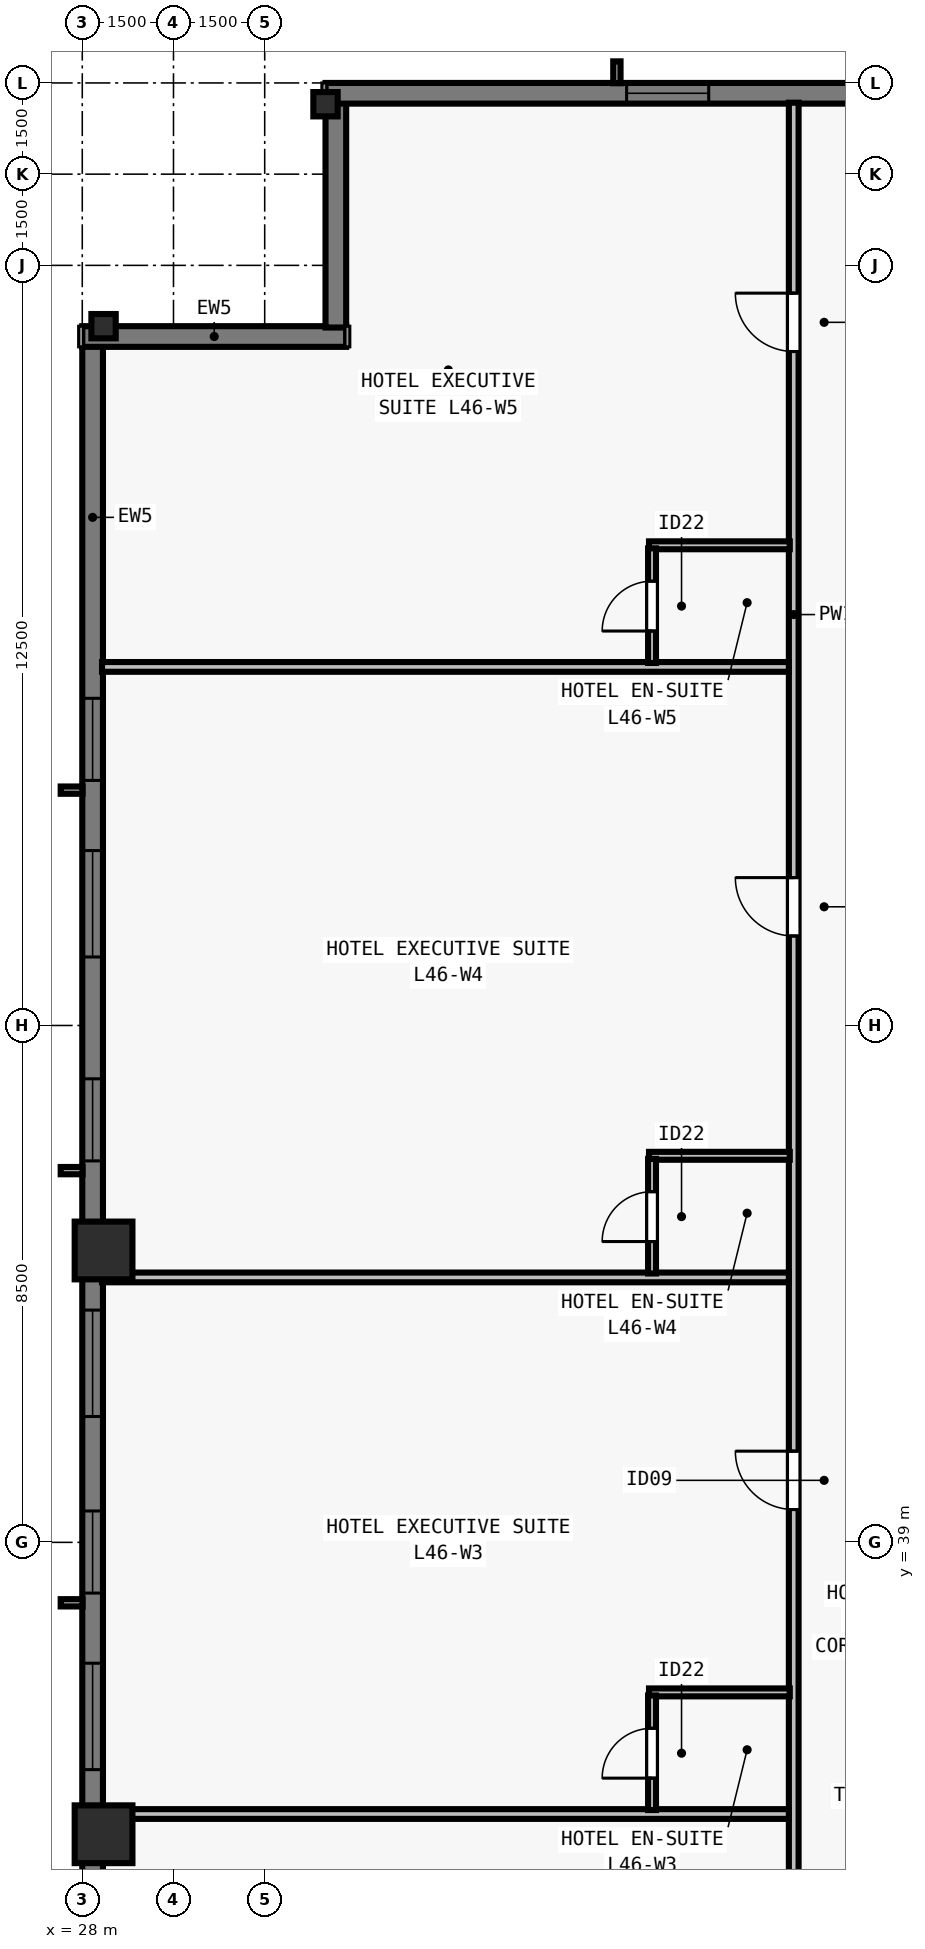
"""IFC4 building model, lengths in metres.
Left out: names, types, materials, properties, quantities, classifications, styles, units other than length and angle.
Written with IfcOpenShell. Run it as: python <this file> out.ifc"""

import sys

from ifc_helpers import new_model, si_unit, direction, frame, frame_2d, origin, origin_2d, place, context, subcontext, project, spatial, rectangle, i_section, extrude, element, fill, save


model = new_model("IFC4")
c1 = context("Model", 3, precision=1e-05, world=origin(), true_north=direction((0.0, 1.0)))
c2 = subcontext(c1, "Body", "Model", "MODEL_VIEW")
j1 = project(units=[si_unit("LENGTHUNIT", "METRE"), si_unit("PLANEANGLEUNIT", "RADIAN")], contexts=[c1])
p1 = place(None, origin())
s1 = spatial("IfcSite", under=j1, at=p1, CompositionType="ELEMENT")
p2 = place(p1, origin())
s2 = spatial("IfcBuilding", under=s1, at=p2, CompositionType="ELEMENT")
p3 = place(p2, frame((0.0, 0.0, 169.0)))
s3 = spatial("IfcBuildingStorey", under=s2, at=p3, CompositionType="ELEMENT", Elevation=169.0)
for number, where, z_axis, x_axis in (
    (1, (32.0, 62.65, 0.0), (0.0, 0.0, 1.0), (1.0, 0.0, 0.0)),
    (2, (28.35, 59.0, 0.0), (0.0, 0.0, 1.0), (0.0, 1.0, 0.0)),
):
    element("IfcColumn", number, at=place(p3, frame(where, z_axis=z_axis, x_axis=x_axis)), inside=s3, PredefinedType="COLUMN", context=c2, shape_type="SweptSolid", body=[
        extrude(i_section(OverallWidth=0.4, OverallDepth=0.4, WebThickness=0.022, FlangeThickness=0.036, at=origin_2d()), origin(), (0.0, 0.0, 1.0), 3.5),
    ])
for number, where, z_axis, x_axis in (
    (3, (28.35, 43.8, 0.0), (0.0, 0.0, 1.0), (0.0, 1.0, 0.0)),
    (4, (28.35, 34.2, 0.0), (0.0, 0.0, 1.0), (0.0, 1.0, 0.0)),
):
    element("IfcColumn", number, at=place(p3, frame(where, z_axis=z_axis, x_axis=x_axis)), inside=s3, PredefinedType="COLUMN", context=c2, shape_type="SweptSolid", body=[
        extrude(rectangle(XDim=0.95, YDim=0.95, at=origin_2d()), origin(), (0.0, 0.0, 1.0), 3.5),
    ])
p4 = place(p3, frame((28.17, 19.0, 0.0), z_axis=(0.0, 0.0, 1.0), x_axis=(0.0, 1.0, 0.0)))
e5 = element("IfcWall", 5, at=p4, inside=s3, PredefinedType="SOLIDWALL", context=c2, shape_type="SweptSolid", body=[
    extrude(rectangle(XDim=39.682, YDim=0.34, at=frame_2d((19.841, 0.0))), origin(), (0.0, 0.0, 1.0), 3.28),
])
p5 = place(p4, frame((5.802, 0.0, 0.8)))
e6 = element("IfcOpeningElement", 6, at=p5, cuts=e5, PredefinedType="OPENING", context=c2, shape_type="SweptSolid", body=[
    extrude(rectangle(XDim=1.35, YDim=1.66, at=frame_2d((0.675, 0.83))), frame((0.0, 0.18, 0.0), z_axis=(0.0, -1.0, 0.0), x_axis=(1.0, 0.0, 0.0)), (0.0, 0.0, 1.0), 0.36),
])
p6 = place(p4, frame((8.305, 0.0, 0.8)))
e7 = element("IfcOpeningElement", 7, at=p6, cuts=e5, PredefinedType="OPENING", context=c2, shape_type="SweptSolid", body=[
    extrude(rectangle(XDim=1.75, YDim=1.66, at=frame_2d((0.875, 0.83))), frame((0.0, 0.18, 0.0), z_axis=(0.0, -1.0, 0.0), x_axis=(1.0, 0.0, 0.0)), (0.0, 0.0, 1.0), 0.36),
])
p7 = place(p4, frame((12.059, 0.0, 0.8)))
e8 = element("IfcOpeningElement", 8, at=p7, cuts=e5, PredefinedType="OPENING", context=c2, shape_type="SweptSolid", body=[
    extrude(rectangle(XDim=1.35, YDim=1.66, at=frame_2d((0.675, 0.83))), frame((0.0, 0.18, 0.0), z_axis=(0.0, -1.0, 0.0), x_axis=(1.0, 0.0, 0.0)), (0.0, 0.0, 1.0), 0.36),
])
p8 = place(p4, frame((16.262, 0.0, 0.8)))
e9 = element("IfcOpeningElement", 9, at=p8, cuts=e5, PredefinedType="OPENING", context=c2, shape_type="SweptSolid", body=[
    extrude(rectangle(XDim=1.75, YDim=1.66, at=frame_2d((0.875, 0.83))), frame((0.0, 0.18, 0.0), z_axis=(0.0, -1.0, 0.0), x_axis=(1.0, 0.0, 0.0)), (0.0, 0.0, 1.0), 0.36),
])
p9 = place(p4, frame((19.166, 0.0, 0.8)))
e10 = element("IfcOpeningElement", 10, at=p9, cuts=e5, PredefinedType="OPENING", context=c2, shape_type="SweptSolid", body=[
    extrude(rectangle(XDim=1.35, YDim=1.66, at=frame_2d((0.675, 0.83))), frame((0.0, 0.18, 0.0), z_axis=(0.0, -1.0, 0.0), x_axis=(1.0, 0.0, 0.0)), (0.0, 0.0, 1.0), 0.36),
])
p10 = place(p4, frame((22.07, 0.0, 0.8)))
e11 = element("IfcOpeningElement", 11, at=p10, cuts=e5, PredefinedType="OPENING", context=c2, shape_type="SweptSolid", body=[
    extrude(rectangle(XDim=1.75, YDim=1.66, at=frame_2d((0.875, 0.83))), frame((0.0, 0.18, 0.0), z_axis=(0.0, -1.0, 0.0), x_axis=(1.0, 0.0, 0.0)), (0.0, 0.0, 1.0), 0.36),
])
p11 = place(p4, frame((26.273, 0.0, 0.8)))
e12 = element("IfcOpeningElement", 12, at=p11, cuts=e5, PredefinedType="OPENING", context=c2, shape_type="SweptSolid", body=[
    extrude(rectangle(XDim=1.35, YDim=1.66, at=frame_2d((0.675, 0.83))), frame((0.0, 0.18, 0.0), z_axis=(0.0, -1.0, 0.0), x_axis=(1.0, 0.0, 0.0)), (0.0, 0.0, 1.0), 0.36),
])
p12 = place(p4, frame((29.627, 0.0, 0.8)))
e13 = element("IfcOpeningElement", 13, at=p12, cuts=e5, PredefinedType="OPENING", context=c2, shape_type="SweptSolid", body=[
    extrude(rectangle(XDim=1.75, YDim=1.66, at=frame_2d((0.875, 0.83))), frame((0.0, 0.18, 0.0), z_axis=(0.0, -1.0, 0.0), x_axis=(1.0, 0.0, 0.0)), (0.0, 0.0, 1.0), 0.36),
])
p13 = place(p4, frame((32.53, 0.0, 0.8)))
e14 = element("IfcOpeningElement", 14, at=p13, cuts=e5, PredefinedType="OPENING", context=c2, shape_type="SweptSolid", body=[
    extrude(rectangle(XDim=1.35, YDim=1.66, at=frame_2d((0.675, 0.83))), frame((0.0, 0.18, 0.0), z_axis=(0.0, -1.0, 0.0), x_axis=(1.0, 0.0, 0.0)), (0.0, 0.0, 1.0), 0.36),
])
p14 = place(p3, frame((28.0, 58.83, 0.0), z_axis=(0.0, 0.0, 1.0), x_axis=(1.0, 0.0, 0.0)))
e15 = element("IfcWall", 15, at=p14, inside=s3, PredefinedType="SOLIDWALL", context=c2, shape_type="SweptSolid", body=[
    extrude(rectangle(XDim=4.34, YDim=0.34, at=frame_2d((2.17, 0.0))), origin(), (0.0, 0.0, 1.0), 3.28),
])
p15 = place(p3, frame((32.17, 58.978, 0.0), z_axis=(0.0, 0.0, 1.0), x_axis=(0.0, 1.0, 0.0)))
e16 = element("IfcWall", 16, at=p15, inside=s3, PredefinedType="SOLIDWALL", context=c2, shape_type="SweptSolid", body=[
    extrude(rectangle(XDim=3.704, YDim=0.34, at=frame_2d((1.852, 0.0))), origin(), (0.0, 0.0, 1.0), 3.28),
])
p16 = place(p3, frame((32.0, 62.83, 0.0), z_axis=(0.0, 0.0, 1.0), x_axis=(1.0, 0.0, 0.0)))
e17 = element("IfcWall", 17, at=p16, inside=s3, PredefinedType="SOLIDWALL", context=c2, shape_type="SweptSolid", body=[
    extrude(rectangle(XDim=39.682, YDim=0.34, at=frame_2d((19.841, 0.0))), origin(), (0.0, 0.0, 1.0), 3.28),
])
p17 = place(p16, frame((4.952, 0.0, 0.8)))
e18 = element("IfcOpeningElement", 18, at=p17, cuts=e17, PredefinedType="OPENING", context=c2, shape_type="SweptSolid", body=[
    extrude(rectangle(XDim=1.35, YDim=1.66, at=frame_2d((0.675, 0.83))), frame((0.0, 0.18, 0.0), z_axis=(0.0, -1.0, 0.0), x_axis=(1.0, 0.0, 0.0)), (0.0, 0.0, 1.0), 0.36),
])
p18 = place(p16, frame((12.059, 0.0, 0.8)))
e19 = element("IfcOpeningElement", 19, at=p18, cuts=e17, PredefinedType="OPENING", context=c2, shape_type="SweptSolid", body=[
    extrude(rectangle(XDim=1.35, YDim=1.66, at=frame_2d((0.675, 0.83))), frame((0.0, 0.18, 0.0), z_axis=(0.0, -1.0, 0.0), x_axis=(1.0, 0.0, 0.0)), (0.0, 0.0, 1.0), 0.36),
])
p19 = place(p16, frame((19.166, 0.0, 0.8)))
e20 = element("IfcOpeningElement", 20, at=p19, cuts=e17, PredefinedType="OPENING", context=c2, shape_type="SweptSolid", body=[
    extrude(rectangle(XDim=1.35, YDim=1.66, at=frame_2d((0.675, 0.83))), frame((0.0, 0.18, 0.0), z_axis=(0.0, -1.0, 0.0), x_axis=(1.0, 0.0, 0.0)), (0.0, 0.0, 1.0), 0.36),
])
p20 = place(p16, frame((21.27, 0.0, 0.8)))
e21 = element("IfcOpeningElement", 21, at=p20, cuts=e17, PredefinedType="OPENING", context=c2, shape_type="SweptSolid", body=[
    extrude(rectangle(XDim=1.75, YDim=1.66, at=frame_2d((0.875, 0.83))), frame((0.0, 0.18, 0.0), z_axis=(0.0, -1.0, 0.0), x_axis=(1.0, 0.0, 0.0)), (0.0, 0.0, 1.0), 0.36),
])
p21 = place(p16, frame((26.273, 0.0, 0.8)))
e22 = element("IfcOpeningElement", 22, at=p21, cuts=e17, PredefinedType="OPENING", context=c2, shape_type="SweptSolid", body=[
    extrude(rectangle(XDim=1.35, YDim=1.66, at=frame_2d((0.675, 0.83))), frame((0.0, 0.18, 0.0), z_axis=(0.0, -1.0, 0.0), x_axis=(1.0, 0.0, 0.0)), (0.0, 0.0, 1.0), 0.36),
])
p22 = place(p16, frame((29.627, 0.0, 0.8)))
e23 = element("IfcOpeningElement", 23, at=p22, cuts=e17, PredefinedType="OPENING", context=c2, shape_type="SweptSolid", body=[
    extrude(rectangle(XDim=1.75, YDim=1.66, at=frame_2d((0.875, 0.83))), frame((0.0, 0.18, 0.0), z_axis=(0.0, -1.0, 0.0), x_axis=(1.0, 0.0, 0.0)), (0.0, 0.0, 1.0), 0.36),
])
p23 = place(p16, frame((34.47, 0.0, 0.8)))
e24 = element("IfcOpeningElement", 24, at=p23, cuts=e17, PredefinedType="OPENING", context=c2, shape_type="SweptSolid", body=[
    extrude(rectangle(XDim=0.9, YDim=1.66, at=frame_2d((0.45, 0.83))), frame((0.0, 0.18, 0.0), z_axis=(0.0, -1.0, 0.0), x_axis=(1.0, 0.0, 0.0)), (0.0, 0.0, 1.0), 0.36),
])
p24 = place(p3, frame((39.7, 15.325, 0.0), z_axis=(0.0, 0.0, 1.0), x_axis=(0.0, 1.0, 0.0)))
e25 = element("IfcWall", 25, at=p24, inside=s3, PredefinedType="PARTITIONING", context=c2, shape_type="SweptSolid", body=[
    extrude(rectangle(XDim=47.35, YDim=0.16, at=frame_2d((23.675, 0.0))), origin(), (0.0, 0.0, 1.0), 2.555),
])
p25 = place(p24, frame((5.451, 0.0, 0.0)))
e26 = element("IfcOpeningElement", 26, at=p25, cuts=e25, PredefinedType="OPENING", context=c2, shape_type="SweptSolid", body=[
    extrude(rectangle(XDim=0.96, YDim=2.15, at=frame_2d((0.48, 1.075))), frame((0.0, 0.09, 0.0), z_axis=(0.0, -1.0, 0.0), x_axis=(1.0, 0.0, 0.0)), (0.0, 0.0, 1.0), 0.18),
])
p26 = place(p24, frame((14.783, 0.0, 0.0)))
e27 = element("IfcOpeningElement", 27, at=p26, cuts=e25, PredefinedType="OPENING", context=c2, shape_type="SweptSolid", body=[
    extrude(rectangle(XDim=0.96, YDim=2.15, at=frame_2d((0.48, 1.075))), frame((0.0, 0.09, 0.0), z_axis=(0.0, -1.0, 0.0), x_axis=(1.0, 0.0, 0.0)), (0.0, 0.0, 1.0), 0.18),
])
p27 = place(p24, frame((24.215, 0.0, 0.0)))
e28 = element("IfcOpeningElement", 28, at=p27, cuts=e25, PredefinedType="OPENING", context=c2, shape_type="SweptSolid", body=[
    extrude(rectangle(XDim=0.96, YDim=2.15, at=frame_2d((0.48, 1.075))), frame((0.0, 0.09, 0.0), z_axis=(0.0, -1.0, 0.0), x_axis=(1.0, 0.0, 0.0)), (0.0, 0.0, 1.0), 0.18),
])
p28 = place(p24, frame((33.647, 0.0, 0.0)))
e29 = element("IfcOpeningElement", 29, at=p28, cuts=e25, PredefinedType="OPENING", context=c2, shape_type="SweptSolid", body=[
    extrude(rectangle(XDim=0.96, YDim=2.15, at=frame_2d((0.48, 1.075))), frame((0.0, 0.09, 0.0), z_axis=(0.0, -1.0, 0.0), x_axis=(1.0, 0.0, 0.0)), (0.0, 0.0, 1.0), 0.18),
])
p29 = place(p24, frame((43.258, 0.0, 0.0)))
e30 = element("IfcOpeningElement", 30, at=p29, cuts=e25, PredefinedType="OPENING", context=c2, shape_type="SweptSolid", body=[
    extrude(rectangle(XDim=0.96, YDim=2.15, at=frame_2d((0.48, 1.075))), frame((0.0, 0.09, 0.0), z_axis=(0.0, -1.0, 0.0), x_axis=(1.0, 0.0, 0.0)), (0.0, 0.0, 1.0), 0.18),
])
p30 = place(p3, frame((28.325, 34.533, 0.0), z_axis=(0.0, 0.0, 1.0), x_axis=(1.0, 0.0, 0.0)))
e31 = element("IfcWall", 31, at=p30, inside=s3, PredefinedType="PARTITIONING", context=c2, shape_type="SweptSolid", body=[
    extrude(rectangle(XDim=11.295, YDim=0.16, at=frame_2d((5.647, 0.0))), origin(), (0.0, 0.0, 1.0), 2.896),
])
p31 = place(p3, frame((37.32, 36.533, 0.0), z_axis=(0.0, 0.0, 1.0), x_axis=(1.0, 0.0, 0.0)))
e32 = element("IfcWall", 32, at=p31, inside=s3, PredefinedType="PLUMBINGWALL", context=c2, shape_type="SweptSolid", body=[
    extrude(rectangle(XDim=2.315, YDim=0.13, at=frame_2d((1.157, 0.0))), origin(), (0.0, 0.0, 1.0), 3.28),
])
p32 = place(p3, frame((37.37, 34.598, 0.0), z_axis=(0.0, 0.0, 1.0), x_axis=(0.0, 1.0, 0.0)))
e33 = element("IfcWall", 33, at=p32, inside=s3, PredefinedType="PLUMBINGWALL", context=c2, shape_type="SweptSolid", body=[
    extrude(rectangle(XDim=1.885, YDim=0.13, at=frame_2d((0.942, 0.0))), origin(), (0.0, 0.0, 1.0), 3.28),
])
p33 = place(p32, frame((0.525, 0.0, 0.0)))
e34 = element("IfcOpeningElement", 34, at=p33, cuts=e33, PredefinedType="OPENING", context=c2, shape_type="SweptSolid", body=[
    extrude(rectangle(XDim=0.82, YDim=2.1, at=frame_2d((0.41, 1.05))), frame((0.0, 0.075, 0.0), z_axis=(0.0, -1.0, 0.0), x_axis=(1.0, 0.0, 0.0)), (0.0, 0.0, 1.0), 0.15),
])
p34 = place(p3, frame((28.325, 43.357, 0.0), z_axis=(0.0, 0.0, 1.0), x_axis=(1.0, 0.0, 0.0)))
e35 = element("IfcWall", 35, at=p34, inside=s3, PredefinedType="PARTITIONING", context=c2, shape_type="SweptSolid", body=[
    extrude(rectangle(XDim=11.295, YDim=0.16, at=frame_2d((5.647, 0.0))), origin(), (0.0, 0.0, 1.0), 2.896),
])
p35 = place(p3, frame((37.32, 45.357, 0.0), z_axis=(0.0, 0.0, 1.0), x_axis=(1.0, 0.0, 0.0)))
e36 = element("IfcWall", 36, at=p35, inside=s3, PredefinedType="PLUMBINGWALL", context=c2, shape_type="SweptSolid", body=[
    extrude(rectangle(XDim=2.315, YDim=0.13, at=frame_2d((1.157, 0.0))), origin(), (0.0, 0.0, 1.0), 3.28),
])
p36 = place(p3, frame((37.37, 43.422, 0.0), z_axis=(0.0, 0.0, 1.0), x_axis=(0.0, 1.0, 0.0)))
e37 = element("IfcWall", 37, at=p36, inside=s3, PredefinedType="PLUMBINGWALL", context=c2, shape_type="SweptSolid", body=[
    extrude(rectangle(XDim=1.885, YDim=0.13, at=frame_2d((0.942, 0.0))), origin(), (0.0, 0.0, 1.0), 3.28),
])
p37 = place(p36, frame((0.525, 0.0, 0.0)))
e38 = element("IfcOpeningElement", 38, at=p37, cuts=e37, PredefinedType="OPENING", context=c2, shape_type="SweptSolid", body=[
    extrude(rectangle(XDim=0.82, YDim=2.1, at=frame_2d((0.41, 1.05))), frame((0.0, 0.075, 0.0), z_axis=(0.0, -1.0, 0.0), x_axis=(1.0, 0.0, 0.0)), (0.0, 0.0, 1.0), 0.15),
])
p38 = place(p3, frame((28.325, 53.396, 0.0), z_axis=(0.0, 0.0, 1.0), x_axis=(1.0, 0.0, 0.0)))
e39 = element("IfcWall", 39, at=p38, inside=s3, PredefinedType="PARTITIONING", context=c2, shape_type="SweptSolid", body=[
    extrude(rectangle(XDim=11.295, YDim=0.16, at=frame_2d((5.647, 0.0))), origin(), (0.0, 0.0, 1.0), 2.896),
])
p39 = place(p3, frame((37.32, 55.396, 0.0), z_axis=(0.0, 0.0, 1.0), x_axis=(1.0, 0.0, 0.0)))
e40 = element("IfcWall", 40, at=p39, inside=s3, PredefinedType="PLUMBINGWALL", context=c2, shape_type="SweptSolid", body=[
    extrude(rectangle(XDim=2.315, YDim=0.13, at=frame_2d((1.157, 0.0))), origin(), (0.0, 0.0, 1.0), 3.28),
])
p40 = place(p3, frame((37.37, 53.462, 0.0), z_axis=(0.0, 0.0, 1.0), x_axis=(0.0, 1.0, 0.0)))
e41 = element("IfcWall", 41, at=p40, inside=s3, PredefinedType="PLUMBINGWALL", context=c2, shape_type="SweptSolid", body=[
    extrude(rectangle(XDim=1.885, YDim=0.13, at=frame_2d((0.942, 0.0))), origin(), (0.0, 0.0, 1.0), 3.28),
])
p41 = place(p40, frame((0.525, 0.0, 0.0)))
e42 = element("IfcOpeningElement", 42, at=p41, cuts=e41, PredefinedType="OPENING", context=c2, shape_type="SweptSolid", body=[
    extrude(rectangle(XDim=0.82, YDim=2.1, at=frame_2d((0.41, 1.05))), frame((0.0, 0.075, 0.0), z_axis=(0.0, -1.0, 0.0), x_axis=(1.0, 0.0, 0.0)), (0.0, 0.0, 1.0), 0.15),
])
p42 = place(p8, origin())
e43 = element("IfcWindow", 43, at=p42, inside=s3, PartitioningType="SINGLE_PANEL", PredefinedType="WINDOW", context=c2, shape_type="SweptSolid", body=[
    extrude(rectangle(XDim=1.75, YDim=1.66, at=frame_2d((0.875, 0.83))), frame((0.0, -0.05, 0.0), z_axis=(0.0, -1.0, 0.0), x_axis=(1.0, 0.0, 0.0)), (0.0, 0.0, 1.0), 0.06),
])
fill(e9, e43)
p43 = place(p9, origin())
e44 = element("IfcWindow", 44, at=p43, inside=s3, PartitioningType="SINGLE_PANEL", PredefinedType="WINDOW", context=c2, shape_type="SweptSolid", body=[
    extrude(rectangle(XDim=1.35, YDim=1.66, at=frame_2d((0.675, 0.83))), frame((0.0, -0.05, 0.0), z_axis=(0.0, -1.0, 0.0), x_axis=(1.0, 0.0, 0.0)), (0.0, 0.0, 1.0), 0.06),
])
fill(e10, e44)
p44 = place(p10, origin())
e45 = element("IfcWindow", 45, at=p44, inside=s3, PartitioningType="SINGLE_PANEL", PredefinedType="WINDOW", context=c2, shape_type="SweptSolid", body=[
    extrude(rectangle(XDim=1.75, YDim=1.66, at=frame_2d((0.875, 0.83))), frame((0.0, -0.05, 0.0), z_axis=(0.0, -1.0, 0.0), x_axis=(1.0, 0.0, 0.0)), (0.0, 0.0, 1.0), 0.06),
])
fill(e11, e45)
p45 = place(p11, origin())
e46 = element("IfcWindow", 46, at=p45, inside=s3, PartitioningType="SINGLE_PANEL", PredefinedType="WINDOW", context=c2, shape_type="SweptSolid", body=[
    extrude(rectangle(XDim=1.35, YDim=1.66, at=frame_2d((0.675, 0.83))), frame((0.0, -0.05, 0.0), z_axis=(0.0, -1.0, 0.0), x_axis=(1.0, 0.0, 0.0)), (0.0, 0.0, 1.0), 0.06),
])
fill(e12, e46)
p46 = place(p12, origin())
e47 = element("IfcWindow", 47, at=p46, inside=s3, PartitioningType="SINGLE_PANEL", PredefinedType="WINDOW", context=c2, shape_type="SweptSolid", body=[
    extrude(rectangle(XDim=1.75, YDim=1.66, at=frame_2d((0.875, 0.83))), frame((0.0, -0.05, 0.0), z_axis=(0.0, -1.0, 0.0), x_axis=(1.0, 0.0, 0.0)), (0.0, 0.0, 1.0), 0.06),
])
fill(e13, e47)
p47 = place(p13, origin())
e48 = element("IfcWindow", 48, at=p47, inside=s3, PartitioningType="SINGLE_PANEL", PredefinedType="WINDOW", context=c2, shape_type="SweptSolid", body=[
    extrude(rectangle(XDim=1.35, YDim=1.66, at=frame_2d((0.675, 0.83))), frame((0.0, -0.05, 0.0), z_axis=(0.0, -1.0, 0.0), x_axis=(1.0, 0.0, 0.0)), (0.0, 0.0, 1.0), 0.06),
])
fill(e14, e48)
p48 = place(p17, origin())
e49 = element("IfcWindow", 49, at=p48, inside=s3, PartitioningType="SINGLE_PANEL", PredefinedType="WINDOW", context=c2, shape_type="SweptSolid", body=[
    extrude(rectangle(XDim=1.35, YDim=1.66, at=frame_2d((0.675, 0.83))), frame((0.0, -0.05, 0.0), z_axis=(0.0, -1.0, 0.0), x_axis=(1.0, 0.0, 0.0)), (0.0, 0.0, 1.0), 0.06),
])
fill(e18, e49)
p49 = place(p33, origin())
e50 = element("IfcDoor", 50, at=p49, inside=s3, OperationType="SINGLE_SWING_LEFT", PredefinedType="DOOR", context=c2, shape_type="SweptSolid", body=[
    extrude(rectangle(XDim=0.82, YDim=2.1, at=frame_2d((0.41, 1.05))), frame((0.0, 0.025, 0.0), z_axis=(0.0, -1.0, 0.0), x_axis=(1.0, 0.0, 0.0)), (0.0, 0.0, 1.0), 0.05),
])
fill(e34, e50)
p50 = place(p27, origin())
e51 = element("IfcDoor", 51, at=p50, inside=s3, OperationType="SINGLE_SWING_RIGHT", PredefinedType="DOOR", context=c2, shape_type="SweptSolid", body=[
    extrude(rectangle(XDim=0.96, YDim=2.15, at=frame_2d((0.48, 1.075))), frame((0.0, 0.025, 0.0), z_axis=(0.0, -1.0, 0.0), x_axis=(1.0, 0.0, 0.0)), (0.0, 0.0, 1.0), 0.05),
])
fill(e28, e51)
p51 = place(p37, origin())
e52 = element("IfcDoor", 52, at=p51, inside=s3, OperationType="SINGLE_SWING_LEFT", PredefinedType="DOOR", context=c2, shape_type="SweptSolid", body=[
    extrude(rectangle(XDim=0.82, YDim=2.1, at=frame_2d((0.41, 1.05))), frame((0.0, 0.025, 0.0), z_axis=(0.0, -1.0, 0.0), x_axis=(1.0, 0.0, 0.0)), (0.0, 0.0, 1.0), 0.05),
])
fill(e38, e52)
p52 = place(p28, origin())
e53 = element("IfcDoor", 53, at=p52, inside=s3, OperationType="SINGLE_SWING_RIGHT", PredefinedType="DOOR", context=c2, shape_type="SweptSolid", body=[
    extrude(rectangle(XDim=0.96, YDim=2.15, at=frame_2d((0.48, 1.075))), frame((0.0, 0.025, 0.0), z_axis=(0.0, -1.0, 0.0), x_axis=(1.0, 0.0, 0.0)), (0.0, 0.0, 1.0), 0.05),
])
fill(e29, e53)
p53 = place(p41, origin())
e54 = element("IfcDoor", 54, at=p53, inside=s3, OperationType="SINGLE_SWING_LEFT", PredefinedType="DOOR", context=c2, shape_type="SweptSolid", body=[
    extrude(rectangle(XDim=0.82, YDim=2.1, at=frame_2d((0.41, 1.05))), frame((0.0, 0.025, 0.0), z_axis=(0.0, -1.0, 0.0), x_axis=(1.0, 0.0, 0.0)), (0.0, 0.0, 1.0), 0.05),
])
fill(e42, e54)
p54 = place(p29, origin())
e55 = element("IfcDoor", 55, at=p54, inside=s3, OperationType="SINGLE_SWING_RIGHT", PredefinedType="DOOR", context=c2, shape_type="SweptSolid", body=[
    extrude(rectangle(XDim=0.96, YDim=2.15, at=frame_2d((0.48, 1.075))), frame((0.0, 0.025, 0.0), z_axis=(0.0, -1.0, 0.0), x_axis=(1.0, 0.0, 0.0)), (0.0, 0.0, 1.0), 0.05),
])
fill(e30, e55)
save(model, sys.argv[1])
